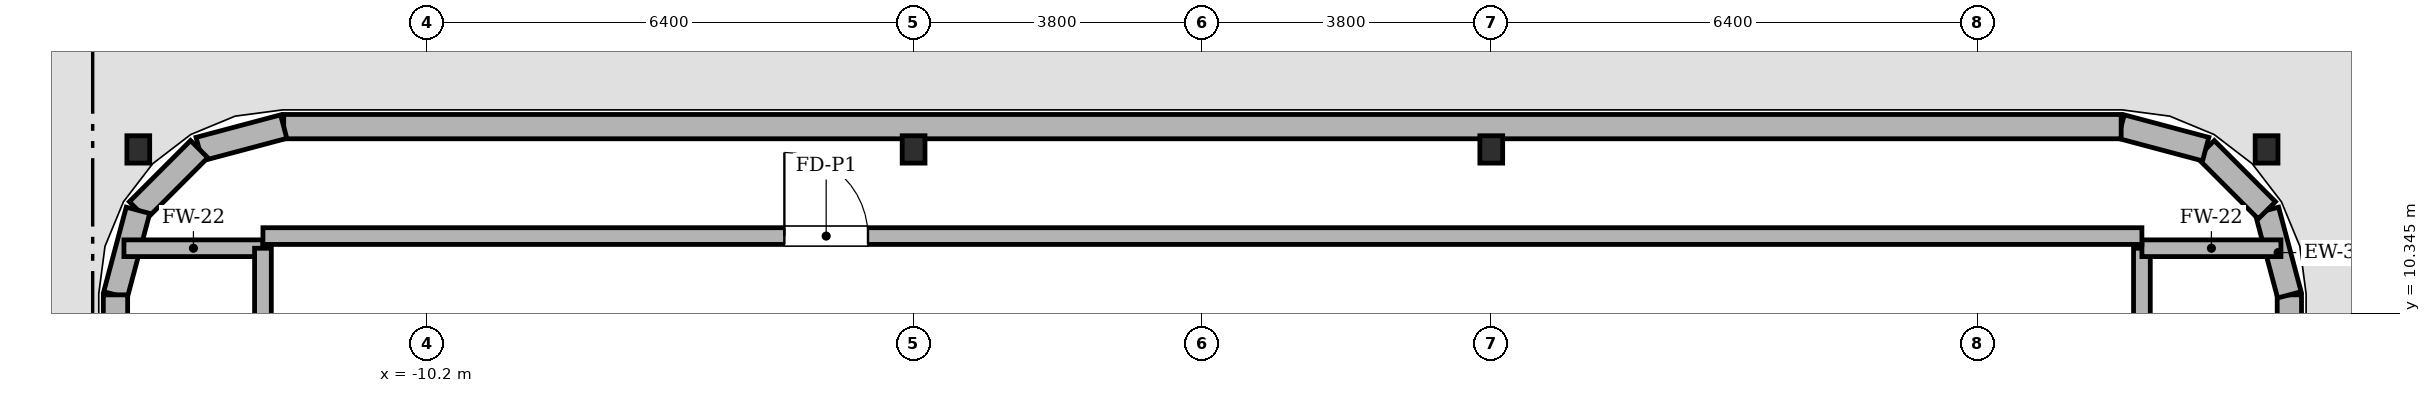
"""IFC4 building model, lengths in metres.
Left out: names, types, materials, properties, quantities, classifications, styles, units other than length and angle.
Written with IfcOpenShell. Run it as: python <this file> out.ifc"""

import sys

from ifc_helpers import new_model, si_unit, direction, frame, frame_2d, origin, origin_2d, place, context, subcontext, project, spatial, rectangle, i_section, extrude, element, fill, save


model = new_model("IFC4")
c1 = context("Model", 3, precision=1e-05, world=origin(), true_north=direction((0.0, 1.0)))
c2 = subcontext(c1, "Body", "Model", "MODEL_VIEW")
j1 = project(units=[si_unit("LENGTHUNIT", "METRE"), si_unit("PLANEANGLEUNIT", "RADIAN")], contexts=[c1])
p1 = place(None, origin())
s1 = spatial("IfcSite", under=j1, at=p1, CompositionType="ELEMENT")
p2 = place(p1, origin())
s2 = spatial("IfcBuilding", under=s1, at=p2, CompositionType="ELEMENT")
p3 = place(p2, frame((0.0, 0.0, 361.8)))
s3 = spatial("IfcBuildingStorey", under=s2, at=p3, CompositionType="ELEMENT", Elevation=361.8)
for number, where, z_axis, x_axis in (
    (1, (-3.8, 12.5, 0.0), (0.0, 0.0, 1.0), (1.0, 0.0, 0.0)),
    (2, (3.8, 12.5, 0.0), (0.0, 0.0, 1.0), (1.0, 0.0, 0.0)),
    (3, (14.0, 12.5, 0.0), (0.0, 0.0, 1.0), (1.0, 0.0, 0.0)),
    (4, (-14.0, 12.5, 0.0), (0.0, 0.0, 1.0), (1.0, 0.0, 0.0)),
):
    element("IfcColumn", number, at=place(p3, frame(where, z_axis=z_axis, x_axis=x_axis)), inside=s3, PredefinedType="COLUMN", context=c2, shape_type="SweptSolid", body=[
        extrude(i_section(OverallWidth=0.3, OverallDepth=0.36, WebThickness=0.012, FlangeThickness=0.022, FilletRadius=0.018, at=origin_2d()), origin(), (0.0, 0.0, 1.0), 4.498),
    ])
p4 = place(p3, frame((14.3, -10.587, 0.0), z_axis=(0.0, 0.0, 1.0), x_axis=(0.0, 1.0, 0.0)))
e5 = element("IfcWall", 5, at=p4, inside=s3, PredefinedType="SOLIDWALL", context=c2, shape_type="SweptSolid", body=[
    extrude(rectangle(XDim=21.174, YDim=0.32, at=frame_2d((10.587, 0.0))), origin(), (0.0, 0.0, 1.0), 2.994),
])
p5 = place(p3, frame((14.3, 10.587, 0.0), z_axis=(0.0, 0.0, 1.0), x_axis=(-0.25727979053, 0.966336954372, 0.0)))
e6 = element("IfcWall", 6, at=p5, inside=s3, PredefinedType="SOLIDWALL", context=c2, shape_type="SweptSolid", body=[
    extrude(rectangle(XDim=1.151, YDim=0.32, at=frame_2d((0.576, 0.0))), origin(), (0.0, 0.0, 1.0), 2.994),
])
p6 = place(p3, frame((14.004, 11.699, 0.0), z_axis=(0.0, 0.0, 1.0), x_axis=(-0.707106781187, 0.707106781187, 0.0)))
e7 = element("IfcWall", 7, at=p6, inside=s3, PredefinedType="SOLIDWALL", context=c2, shape_type="SweptSolid", body=[
    extrude(rectangle(XDim=1.138, YDim=0.32, at=frame_2d((0.569, 0.0))), origin(), (0.0, 0.0, 1.0), 2.994),
])
p7 = place(p3, frame((13.199, 12.504, 0.0), z_axis=(0.0, 0.0, 1.0), x_axis=(-0.966336954372, 0.25727979053, 0.0)))
e8 = element("IfcWall", 8, at=p7, inside=s3, PredefinedType="SOLIDWALL", context=c2, shape_type="SweptSolid", body=[
    extrude(rectangle(XDim=1.151, YDim=0.32, at=frame_2d((0.576, 0.0))), origin(), (0.0, 0.0, 1.0), 2.994),
])
p8 = place(p3, frame((12.087, 12.8, 0.0), z_axis=(0.0, 0.0, 1.0), x_axis=(-1.0, 0.0, 0.0)))
e9 = element("IfcWall", 9, at=p8, inside=s3, PredefinedType="SOLIDWALL", context=c2, shape_type="SweptSolid", body=[
    extrude(rectangle(XDim=24.174, YDim=0.32, at=frame_2d((12.087, 0.0))), origin(), (0.0, 0.0, 1.0), 2.994),
])
p9 = place(p3, frame((-12.087, 12.8, 0.0), z_axis=(0.0, 0.0, 1.0), x_axis=(-0.966336954372, -0.25727979053, 0.0)))
e10 = element("IfcWall", 10, at=p9, inside=s3, PredefinedType="SOLIDWALL", context=c2, shape_type="SweptSolid", body=[
    extrude(rectangle(XDim=1.151, YDim=0.32, at=frame_2d((0.576, 0.0))), origin(), (0.0, 0.0, 1.0), 2.994),
])
p10 = place(p3, frame((-13.199, 12.504, 0.0), z_axis=(0.0, 0.0, 1.0), x_axis=(-0.707106781187, -0.707106781187, 0.0)))
e11 = element("IfcWall", 11, at=p10, inside=s3, PredefinedType="SOLIDWALL", context=c2, shape_type="SweptSolid", body=[
    extrude(rectangle(XDim=1.138, YDim=0.32, at=frame_2d((0.569, 0.0))), origin(), (0.0, 0.0, 1.0), 2.994),
])
p11 = place(p3, frame((-14.004, 11.699, 0.0), z_axis=(0.0, 0.0, 1.0), x_axis=(-0.25727979053, -0.966336954372, 0.0)))
e12 = element("IfcWall", 12, at=p11, inside=s3, PredefinedType="SOLIDWALL", context=c2, shape_type="SweptSolid", body=[
    extrude(rectangle(XDim=1.151, YDim=0.32, at=frame_2d((0.576, 0.0))), origin(), (0.0, 0.0, 1.0), 2.994),
])
p12 = place(p3, frame((-14.3, 10.587, 0.0), z_axis=(0.0, 0.0, 1.0), x_axis=(0.0, -1.0, 0.0)))
e13 = element("IfcWall", 13, at=p12, inside=s3, PredefinedType="SOLIDWALL", context=c2, shape_type="SweptSolid", body=[
    extrude(rectangle(XDim=21.174, YDim=0.32, at=frame_2d((10.587, 0.0))), origin(), (0.0, 0.0, 1.0), 2.994),
])
p13 = place(p3, frame((-14.189, 11.2, 0.0), z_axis=(0.0, 0.0, 1.0), x_axis=(1.0, 0.0, 0.0)))
e14 = element("IfcWall", 14, at=p13, inside=s3, PredefinedType="SOLIDWALL", context=c2, shape_type="SweptSolid", body=[
    extrude(rectangle(XDim=1.829, YDim=0.22, at=frame_2d((0.915, 0.0))), origin(), (0.0, 0.0, 1.0), 2.994),
])
p14 = place(p3, frame((-12.36, 11.2, 0.0), z_axis=(0.0, 0.0, 1.0), x_axis=(0.0, -1.0, 0.0)))
e15 = element("IfcWall", 15, at=p14, inside=s3, PredefinedType="SOLIDWALL", context=c2, shape_type="SweptSolid", body=[
    extrude(rectangle(XDim=22.4, YDim=0.22, at=frame_2d((11.2, 0.0))), origin(), (0.0, 0.0, 1.0), 2.994),
])
p15 = place(p14, frame((10.65, 0.0, 0.0)))
e16 = element("IfcOpeningElement", 16, at=p15, cuts=e15, PredefinedType="OPENING", context=c2, shape_type="SweptSolid", body=[
    extrude(rectangle(XDim=1.1, YDim=2.2, at=frame_2d((0.55, 1.1))), frame((0.0, 0.12, 0.0), z_axis=(0.0, -1.0, 0.0), x_axis=(1.0, 0.0, 0.0)), (0.0, 0.0, 1.0), 0.24),
])
p16 = place(p3, frame((12.36, -11.2, 0.0), z_axis=(0.0, 0.0, 1.0), x_axis=(0.0, 1.0, 0.0)))
e17 = element("IfcWall", 17, at=p16, inside=s3, PredefinedType="SOLIDWALL", context=c2, shape_type="SweptSolid", body=[
    extrude(rectangle(XDim=22.4, YDim=0.22, at=frame_2d((11.2, 0.0))), origin(), (0.0, 0.0, 1.0), 2.994),
])
p17 = place(p16, frame((10.65, 0.0, 0.0)))
e18 = element("IfcOpeningElement", 18, at=p17, cuts=e17, PredefinedType="OPENING", context=c2, shape_type="SweptSolid", body=[
    extrude(rectangle(XDim=1.1, YDim=2.2, at=frame_2d((0.55, 1.1))), frame((0.0, 0.12, 0.0), z_axis=(0.0, -1.0, 0.0), x_axis=(1.0, 0.0, 0.0)), (0.0, 0.0, 1.0), 0.24),
])
p18 = place(p3, frame((12.36, 11.2, 0.0), z_axis=(0.0, 0.0, 1.0), x_axis=(1.0, 0.0, 0.0)))
e19 = element("IfcWall", 19, at=p18, inside=s3, PredefinedType="SOLIDWALL", context=c2, shape_type="SweptSolid", body=[
    extrude(rectangle(XDim=1.829, YDim=0.22, at=frame_2d((0.915, 0.0))), origin(), (0.0, 0.0, 1.0), 2.994),
])
p19 = place(p3, frame((12.36, 11.36, 0.0), z_axis=(0.0, 0.0, 1.0), x_axis=(-1.0, 0.0, 0.0)))
e20 = element("IfcWall", 20, at=p19, inside=s3, PredefinedType="SOLIDWALL", context=c2, shape_type="SweptSolid", body=[
    extrude(rectangle(XDim=24.72, YDim=0.22, at=frame_2d((12.36, 0.0))), origin(), (0.0, 0.0, 1.0), 2.994),
])
p20 = place(p19, frame((16.76, 0.0, 0.0)))
e21 = element("IfcOpeningElement", 21, at=p20, cuts=e20, PredefinedType="OPENING", context=c2, shape_type="SweptSolid", body=[
    extrude(rectangle(XDim=1.1, YDim=2.2, at=frame_2d((0.55, 1.1))), frame((0.0, 0.12, 0.0), z_axis=(0.0, -1.0, 0.0), x_axis=(1.0, 0.0, 0.0)), (0.0, 0.0, 1.0), 0.24),
])
p21 = place(p20, origin())
e22 = element("IfcDoor", 22, at=p21, inside=s3, OperationType="SINGLE_SWING_RIGHT", PredefinedType="DOOR", context=c2, shape_type="SweptSolid", body=[
    extrude(rectangle(XDim=1.1, YDim=2.2, at=frame_2d((0.55, 1.1))), frame((0.0, 0.025, 0.0), z_axis=(0.0, -1.0, 0.0), x_axis=(1.0, 0.0, 0.0)), (0.0, 0.0, 1.0), 0.05),
])
fill(e21, e22)
save(model, sys.argv[1])
